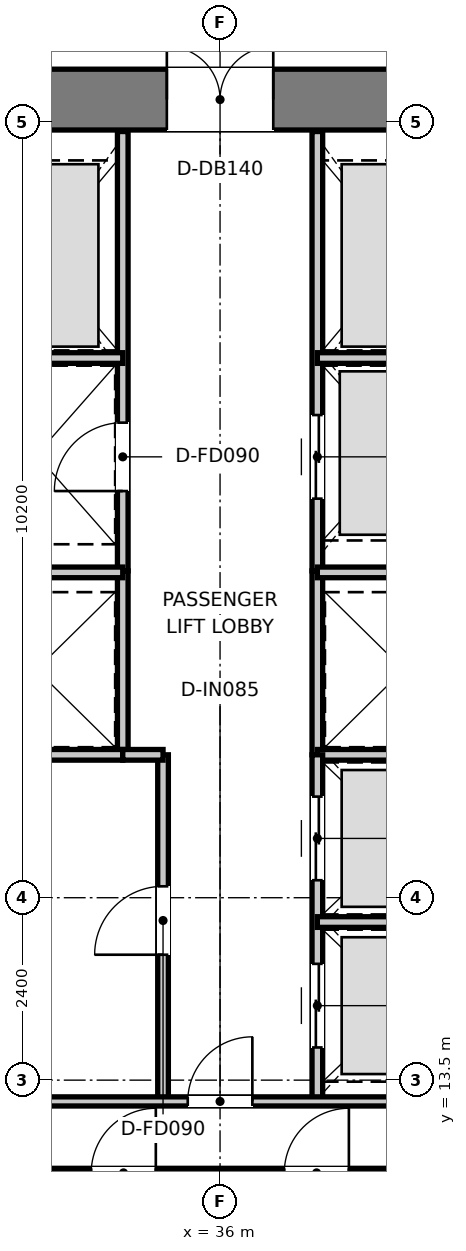
"""IFC4 building model, lengths in metres.
Left out: names, types, materials, properties, quantities, classifications, styles, units other than length and angle.
Written with IfcOpenShell. Run it as: python <this file> out.ifc"""

import sys

from ifc_helpers import new_model, si_unit, direction, frame, frame_2d, origin, place, context, subcontext, project, spatial, rectangle, extrude, element, fill, save


model = new_model("IFC4")
c1 = context("Model", 3, precision=1e-05, world=origin(), true_north=direction((0.0, 1.0)))
c2 = subcontext(c1, "Body", "Model", "MODEL_VIEW")
j1 = project(units=[si_unit("LENGTHUNIT", "METRE"), si_unit("PLANEANGLEUNIT", "RADIAN")], contexts=[c1])
p1 = place(None, origin())
s1 = spatial("IfcSite", under=j1, at=p1, CompositionType="ELEMENT")
p2 = place(p1, origin())
s2 = spatial("IfcBuilding", under=s1, at=p2, CompositionType="ELEMENT")
p3 = place(p2, frame((0.0, 0.0, 250.75)))
s3 = spatial("IfcBuildingStorey", under=s2, at=p3, CompositionType="ELEMENT", Elevation=250.75)
p4 = place(p3, frame((28.08, 26.4, 0.0), z_axis=(0.0, 0.0, 1.0), x_axis=(1.0, 0.0, 0.0)))
e1 = element("IfcWall", 1, at=p4, inside=s3, PredefinedType="SHEAR", context=c2, shape_type="SweptSolid", body=[
    extrude(rectangle(XDim=15.84, YDim=0.8, at=frame_2d((7.92, 0.0))), origin(), (0.0, 0.0, 1.0), 3.95),
])
p5 = place(p4, frame((7.22, 0.0, 0.0)))
e2 = element("IfcOpeningElement", 2, at=p5, cuts=e1, PredefinedType="OPENING", context=c2, shape_type="SweptSolid", body=[
    extrude(rectangle(XDim=1.4, YDim=2.2, at=frame_2d((0.7, 1.1))), frame((0.0, 0.41, 0.0), z_axis=(0.0, -1.0, 0.0), x_axis=(1.0, 0.0, 0.0)), (0.0, 0.0, 1.0), 0.82),
])
p6 = place(p4, frame((1.775, 0.0, 0.0)))
e3 = element("IfcOpeningElement", 3, at=p6, cuts=e1, PredefinedType="OPENING", context=c2, shape_type="SweptSolid", body=[
    extrude(rectangle(XDim=1.05, YDim=2.1, at=frame_2d((0.525, 1.05))), frame((0.0, 0.41, 0.0), z_axis=(0.0, -1.0, 0.0), x_axis=(1.0, 0.0, 0.0)), (0.0, 0.0, 1.0), 0.82),
])
p7 = place(p4, frame((13.015, 0.0, 0.0)))
e4 = element("IfcOpeningElement", 4, at=p7, cuts=e1, PredefinedType="OPENING", context=c2, shape_type="SweptSolid", body=[
    extrude(rectangle(XDim=1.05, YDim=2.1, at=frame_2d((0.525, 1.05))), frame((0.0, 0.41, 0.0), z_axis=(0.0, -1.0, 0.0), x_axis=(1.0, 0.0, 0.0)), (0.0, 0.0, 1.0), 0.82),
])
p8 = place(p3, frame((34.72, 20.2, 0.0), z_axis=(0.0, 0.0, 1.0), x_axis=(0.0, 1.0, 0.0)))
e5 = element("IfcWall", 5, at=p8, inside=s3, PredefinedType="PARTITIONING", context=c2, shape_type="SweptSolid", body=[
    extrude(rectangle(XDim=5.78, YDim=0.14, at=frame_2d((2.89, 0.0))), origin(), (0.0, 0.0, 1.0), 2.82),
])
p9 = place(p8, frame((1.05, 0.0, 0.0)))
e6 = element("IfcOpeningElement", 6, at=p9, cuts=e5, PredefinedType="OPENING", context=c2, shape_type="SweptSolid", body=[
    extrude(rectangle(XDim=0.9, YDim=2.1, at=frame_2d((0.45, 1.05))), frame((0.0, 0.08, 0.0), z_axis=(0.0, -1.0, 0.0), x_axis=(1.0, 0.0, 0.0)), (0.0, 0.0, 1.0), 0.16),
])
p10 = place(p3, frame((37.28, 20.2, 0.0), z_axis=(0.0, 0.0, 1.0), x_axis=(0.0, 1.0, 0.0)))
e7 = element("IfcWall", 7, at=p10, inside=s3, PredefinedType="PARTITIONING", context=c2, shape_type="SweptSolid", body=[
    extrude(rectangle(XDim=5.78, YDim=0.14, at=frame_2d((2.89, 0.0))), origin(), (0.0, 0.0, 1.0), 2.82),
])
p11 = place(p10, frame((0.95, 0.0, 0.0)))
e8 = element("IfcOpeningElement", 8, at=p11, cuts=e7, PredefinedType="OPENING", context=c2, shape_type="SweptSolid", body=[
    extrude(rectangle(XDim=1.1, YDim=2.15, at=frame_2d((0.55, 1.075))), frame((0.0, 0.08, 0.0), z_axis=(0.0, -1.0, 0.0), x_axis=(1.0, 0.0, 0.0)), (0.0, 0.0, 1.0), 0.16),
])
for number, where, z_axis, x_axis in (
    (9, (32.45, 23.0, 0.0), (0.0, 0.0, 1.0), (1.0, 0.0, 0.0)),
    (10, (37.28, 23.0, 0.0), (0.0, 0.0, 1.0), (1.0, 0.0, 0.0)),
):
    element("IfcWall", number, at=place(p3, frame(where, z_axis=z_axis, x_axis=x_axis)), inside=s3, PredefinedType="PARTITIONING", context=c2, shape_type="SweptSolid", body=[
        extrude(rectangle(XDim=2.27, YDim=0.14, at=frame_2d((1.135, 0.0))), origin(), (0.0, 0.0, 1.0), 2.82),
    ])
for number, where, z_axis, x_axis in (
    (11, (34.72, 17.78, 0.0), (0.0, 0.0, 1.0), (0.0, 1.0, 0.0)),
    (12, (37.28, 17.78, 0.0), (0.0, 0.0, 1.0), (0.0, 1.0, 0.0)),
):
    element("IfcWall", number, at=place(p3, frame(where, z_axis=z_axis, x_axis=x_axis)), inside=s3, PredefinedType="PARTITIONING", context=c2, shape_type="SweptSolid", body=[
        extrude(rectangle(XDim=2.42, YDim=0.14, at=frame_2d((1.21, 0.0))), origin(), (0.0, 0.0, 1.0), 3.67),
    ])
for number, where, z_axis, x_axis in (
    (13, (32.45, 17.78, 0.0), (0.0, 0.0, 1.0), (1.0, 0.0, 0.0)),
    (14, (32.45, 20.18, 0.0), (0.0, 0.0, 1.0), (1.0, 0.0, 0.0)),
    (15, (37.28, 17.78, 0.0), (0.0, 0.0, 1.0), (1.0, 0.0, 0.0)),
    (16, (37.28, 20.18, 0.0), (0.0, 0.0, 1.0), (1.0, 0.0, 0.0)),
):
    element("IfcWall", number, at=place(p3, frame(where, z_axis=z_axis, x_axis=x_axis)), inside=s3, PredefinedType="PARTITIONING", context=c2, shape_type="SweptSolid", body=[
        extrude(rectangle(XDim=2.27, YDim=0.14, at=frame_2d((1.135, 0.0))), origin(), (0.0, 0.0, 1.0), 3.67),
    ])
p12 = place(p3, frame((35.25, 13.22, 0.0), z_axis=(0.0, 0.0, 1.0), x_axis=(0.0, 1.0, 0.0)))
e17 = element("IfcWall", 17, at=p12, inside=s3, PredefinedType="PARTITIONING", context=c2, shape_type="SweptSolid", body=[
    extrude(rectangle(XDim=4.56, YDim=0.14, at=frame_2d((2.28, 0.0))), origin(), (0.0, 0.0, 1.0), 3.67),
])
p13 = place(p12, frame((1.93, 0.0, 0.0)))
e18 = element("IfcOpeningElement", 18, at=p13, cuts=e17, PredefinedType="OPENING", context=c2, shape_type="SweptSolid", body=[
    extrude(rectangle(XDim=0.9, YDim=2.1, at=frame_2d((0.45, 1.05))), frame((0.0, 0.08, 0.0), z_axis=(0.0, -1.0, 0.0), x_axis=(1.0, 0.0, 0.0)), (0.0, 0.0, 1.0), 0.16),
])
p14 = place(p3, frame((34.72, 17.78, 0.0), z_axis=(0.0, 0.0, 1.0), x_axis=(1.0, 0.0, 0.0)))
e19 = element("IfcWall", 19, at=p14, inside=s3, PredefinedType="PARTITIONING", context=c2, shape_type="SweptSolid", body=[
    extrude(rectangle(XDim=0.53, YDim=0.14, at=frame_2d((0.265, 0.0))), origin(), (0.0, 0.0, 1.0), 3.67),
])
p15 = place(p3, frame((37.28, 13.22, 0.0), z_axis=(0.0, 0.0, 1.0), x_axis=(0.0, 1.0, 0.0)))
e20 = element("IfcWall", 20, at=p15, inside=s3, PredefinedType="PARTITIONING", context=c2, shape_type="SweptSolid", body=[
    extrude(rectangle(XDim=4.56, YDim=0.14, at=frame_2d((2.28, 0.0))), origin(), (0.0, 0.0, 1.0), 3.67),
])
p16 = place(p15, frame((0.71, 0.0, 0.0)))
e21 = element("IfcOpeningElement", 21, at=p16, cuts=e20, PredefinedType="OPENING", context=c2, shape_type="SweptSolid", body=[
    extrude(rectangle(XDim=1.1, YDim=2.15, at=frame_2d((0.55, 1.075))), frame((0.0, 0.08, 0.0), z_axis=(0.0, -1.0, 0.0), x_axis=(1.0, 0.0, 0.0)), (0.0, 0.0, 1.0), 0.16),
])
p17 = place(p15, frame((2.91, 0.0, 0.0)))
e22 = element("IfcOpeningElement", 22, at=p17, cuts=e20, PredefinedType="OPENING", context=c2, shape_type="SweptSolid", body=[
    extrude(rectangle(XDim=1.1, YDim=2.15, at=frame_2d((0.55, 1.075))), frame((0.0, 0.08, 0.0), z_axis=(0.0, -1.0, 0.0), x_axis=(1.0, 0.0, 0.0)), (0.0, 0.0, 1.0), 0.16),
])
p18 = place(p3, frame((37.28, 15.58, 0.0), z_axis=(0.0, 0.0, 1.0), x_axis=(1.0, 0.0, 0.0)))
e23 = element("IfcWall", 23, at=p18, inside=s3, PredefinedType="PARTITIONING", context=c2, shape_type="SweptSolid", body=[
    extrude(rectangle(XDim=2.27, YDim=0.14, at=frame_2d((1.135, 0.0))), origin(), (0.0, 0.0, 1.0), 3.67),
])
p19 = place(p3, frame((32.21, 13.22, 0.0), z_axis=(0.0, 0.0, 1.0), x_axis=(1.0, 0.0, 0.0)))
e24 = element("IfcWall", 24, at=p19, inside=s3, PredefinedType="PARTITIONING", context=c2, shape_type="SweptSolid", body=[
    extrude(rectangle(XDim=7.58, YDim=0.12, at=frame_2d((3.79, 0.0))), origin(), (0.0, 0.0, 1.0), 3.67),
])
p20 = place(p19, frame((3.365, 0.0, 0.0)))
e25 = element("IfcOpeningElement", 25, at=p20, cuts=e24, PredefinedType="OPENING", context=c2, shape_type="SweptSolid", body=[
    extrude(rectangle(XDim=0.85, YDim=2.1, at=frame_2d((0.425, 1.05))), frame((0.0, 0.07, 0.0), z_axis=(0.0, -1.0, 0.0), x_axis=(1.0, 0.0, 0.0)), (0.0, 0.0, 1.0), 0.14),
])
p21 = place(p3, frame((32.21, 12.28, 0.0), z_axis=(0.0, 0.0, 1.0), x_axis=(1.0, 0.0, 0.0)))
e26 = element("IfcWall", 26, at=p21, inside=s3, PredefinedType="PARTITIONING", context=c2, shape_type="SweptSolid", body=[
    extrude(rectangle(XDim=7.58, YDim=0.12, at=frame_2d((3.79, 0.0))), origin(), (0.0, 0.0, 1.0), 3.67),
])
p22 = place(p21, frame((0.205, 0.0, 0.0)))
e27 = element("IfcOpeningElement", 27, at=p22, cuts=e26, PredefinedType="OPENING", context=c2, shape_type="SweptSolid", body=[
    extrude(rectangle(XDim=0.85, YDim=2.1, at=frame_2d((0.425, 1.05))), frame((0.0, 0.07, 0.0), z_axis=(0.0, -1.0, 0.0), x_axis=(1.0, 0.0, 0.0)), (0.0, 0.0, 1.0), 0.14),
])
p23 = place(p21, frame((2.095, 0.0, 0.0)))
e28 = element("IfcOpeningElement", 28, at=p23, cuts=e26, PredefinedType="OPENING", context=c2, shape_type="SweptSolid", body=[
    extrude(rectangle(XDim=0.85, YDim=2.1, at=frame_2d((0.425, 1.05))), frame((0.0, 0.07, 0.0), z_axis=(0.0, -1.0, 0.0), x_axis=(1.0, 0.0, 0.0)), (0.0, 0.0, 1.0), 0.14),
])
p24 = place(p21, frame((4.635, 0.0, 0.0)))
e29 = element("IfcOpeningElement", 29, at=p24, cuts=e26, PredefinedType="OPENING", context=c2, shape_type="SweptSolid", body=[
    extrude(rectangle(XDim=0.85, YDim=2.1, at=frame_2d((0.425, 1.05))), frame((0.0, 0.07, 0.0), z_axis=(0.0, -1.0, 0.0), x_axis=(1.0, 0.0, 0.0)), (0.0, 0.0, 1.0), 0.14),
])
p25 = place(p21, frame((6.525, 0.0, 0.0)))
e30 = element("IfcOpeningElement", 30, at=p25, cuts=e26, PredefinedType="OPENING", context=c2, shape_type="SweptSolid", body=[
    extrude(rectangle(XDim=0.85, YDim=2.1, at=frame_2d((0.425, 1.05))), frame((0.0, 0.07, 0.0), z_axis=(0.0, -1.0, 0.0), x_axis=(1.0, 0.0, 0.0)), (0.0, 0.0, 1.0), 0.14),
])
p26 = place(p5, origin())
e31 = element("IfcDoor", 31, at=p26, inside=s3, OperationType="DOUBLE_DOOR_SINGLE_SWING", PredefinedType="DOOR", context=c2, shape_type="SweptSolid", body=[
    extrude(rectangle(XDim=1.4, YDim=2.2, at=frame_2d((0.7, 1.1))), frame((0.0, 0.025, 0.0), z_axis=(0.0, -1.0, 0.0), x_axis=(1.0, 0.0, 0.0)), (0.0, 0.0, 1.0), 0.05),
])
fill(e2, e31)
p27 = place(p9, origin())
e32 = element("IfcDoor", 32, at=p27, inside=s3, OperationType="SINGLE_SWING_LEFT", PredefinedType="DOOR", context=c2, shape_type="SweptSolid", body=[
    extrude(rectangle(XDim=0.9, YDim=2.1, at=frame_2d((0.45, 1.05))), frame((0.0, 0.025, 0.0), z_axis=(0.0, -1.0, 0.0), x_axis=(1.0, 0.0, 0.0)), (0.0, 0.0, 1.0), 0.05),
])
fill(e6, e32)
p28 = place(p11, origin())
e33 = element("IfcDoor", 33, at=p28, inside=s3, OperationType="DOUBLE_DOOR_SLIDING", PredefinedType="DOOR", context=c2, shape_type="SweptSolid", body=[
    extrude(rectangle(XDim=1.1, YDim=2.15, at=frame_2d((0.55, 1.075))), frame((0.0, 0.025, 0.0), z_axis=(0.0, -1.0, 0.0), x_axis=(1.0, 0.0, 0.0)), (0.0, 0.0, 1.0), 0.05),
])
fill(e8, e33)
p29 = place(p13, origin())
e34 = element("IfcDoor", 34, at=p29, inside=s3, OperationType="SINGLE_SWING_LEFT", PredefinedType="DOOR", context=c2, shape_type="SweptSolid", body=[
    extrude(rectangle(XDim=0.9, YDim=2.1, at=frame_2d((0.45, 1.05))), frame((0.0, 0.025, 0.0), z_axis=(0.0, -1.0, 0.0), x_axis=(1.0, 0.0, 0.0)), (0.0, 0.0, 1.0), 0.05),
])
fill(e18, e34)
p30 = place(p16, origin())
e35 = element("IfcDoor", 35, at=p30, inside=s3, OperationType="DOUBLE_DOOR_SLIDING", PredefinedType="DOOR", context=c2, shape_type="SweptSolid", body=[
    extrude(rectangle(XDim=1.1, YDim=2.15, at=frame_2d((0.55, 1.075))), frame((0.0, 0.025, 0.0), z_axis=(0.0, -1.0, 0.0), x_axis=(1.0, 0.0, 0.0)), (0.0, 0.0, 1.0), 0.05),
])
fill(e21, e35)
p31 = place(p17, origin())
e36 = element("IfcDoor", 36, at=p31, inside=s3, OperationType="DOUBLE_DOOR_SLIDING", PredefinedType="DOOR", context=c2, shape_type="SweptSolid", body=[
    extrude(rectangle(XDim=1.1, YDim=2.15, at=frame_2d((0.55, 1.075))), frame((0.0, 0.025, 0.0), z_axis=(0.0, -1.0, 0.0), x_axis=(1.0, 0.0, 0.0)), (0.0, 0.0, 1.0), 0.05),
])
fill(e22, e36)
p32 = place(p20, origin())
e37 = element("IfcDoor", 37, at=p32, inside=s3, OperationType="SINGLE_SWING_RIGHT", PredefinedType="DOOR", context=c2, shape_type="SweptSolid", body=[
    extrude(rectangle(XDim=0.85, YDim=2.1, at=frame_2d((0.425, 1.05))), frame((0.0, 0.025, 0.0), z_axis=(0.0, -1.0, 0.0), x_axis=(1.0, 0.0, 0.0)), (0.0, 0.0, 1.0), 0.05),
])
fill(e25, e37)
p33 = place(p23, origin())
e38 = element("IfcDoor", 38, at=p33, inside=s3, OperationType="SINGLE_SWING_RIGHT", PredefinedType="DOOR", context=c2, shape_type="SweptSolid", body=[
    extrude(rectangle(XDim=0.85, YDim=2.1, at=frame_2d((0.425, 1.05))), frame((0.0, 0.025, 0.0), z_axis=(0.0, -1.0, 0.0), x_axis=(1.0, 0.0, 0.0)), (0.0, 0.0, 1.0), 0.05),
])
fill(e28, e38)
p34 = place(p24, origin())
e39 = element("IfcDoor", 39, at=p34, inside=s3, OperationType="SINGLE_SWING_RIGHT", PredefinedType="DOOR", context=c2, shape_type="SweptSolid", body=[
    extrude(rectangle(XDim=0.85, YDim=2.1, at=frame_2d((0.425, 1.05))), frame((0.0, 0.025, 0.0), z_axis=(0.0, -1.0, 0.0), x_axis=(1.0, 0.0, 0.0)), (0.0, 0.0, 1.0), 0.05),
])
fill(e29, e39)
save(model, sys.argv[1])
